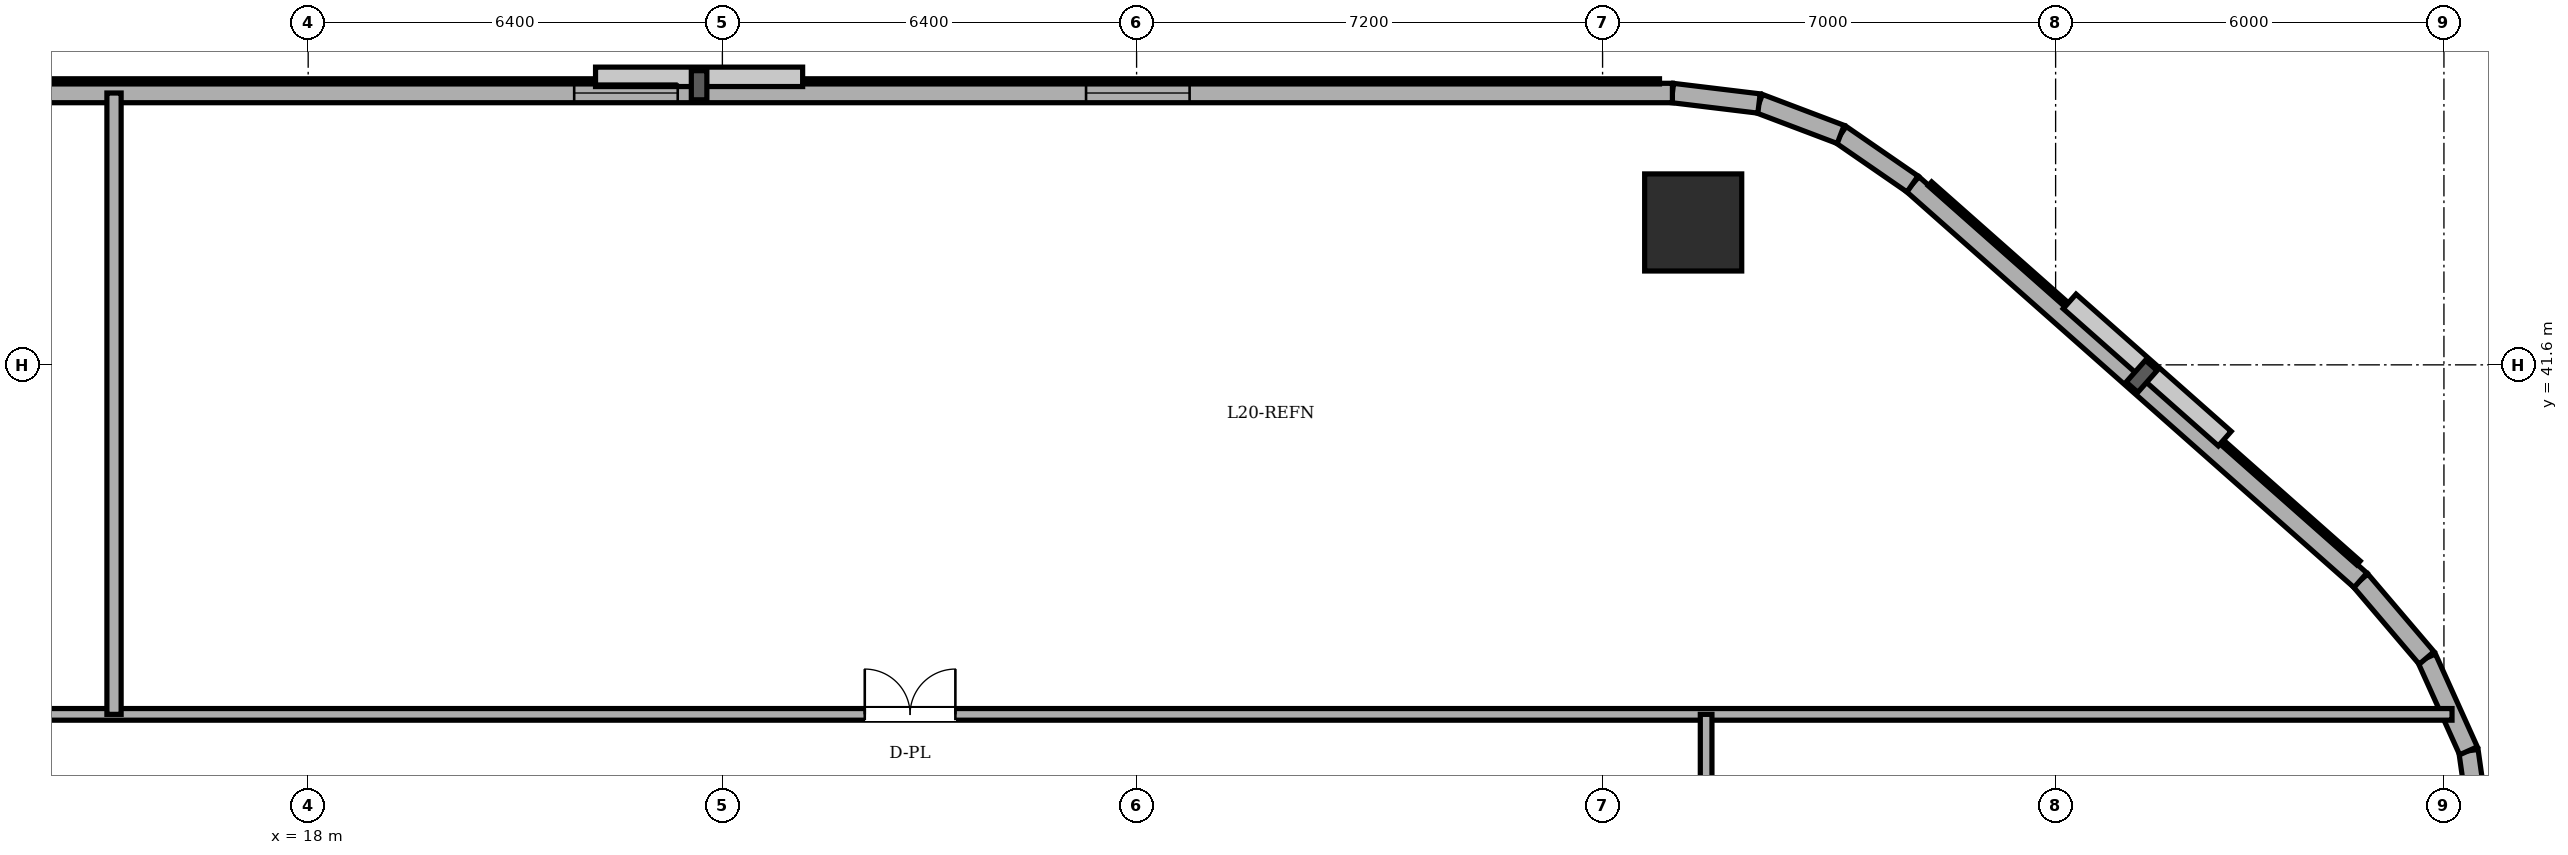
"""IFC4 building model, lengths in metres.
Left out: names, types, materials, properties, quantities, classifications, styles, units other than length and angle.
Written with IfcOpenShell. Run it as: python <this file> out.ifc"""

import sys

from ifc_helpers import new_model, si_unit, direction, frame, frame_2d, origin, origin_2d, place, context, subcontext, project, spatial, rectangle, circle, extrude, element, fill, save


model = new_model("IFC4")
c1 = context("Model", 3, precision=1e-05, world=origin(), true_north=direction((0.0, 1.0)))
c2 = subcontext(c1, "Body", "Model", "MODEL_VIEW")
j1 = project(units=[si_unit("LENGTHUNIT", "METRE"), si_unit("PLANEANGLEUNIT", "RADIAN")], contexts=[c1])
p1 = place(None, origin())
s1 = spatial("IfcSite", under=j1, at=p1, CompositionType="ELEMENT")
p2 = place(p1, origin())
s2 = spatial("IfcBuilding", under=s1, at=p2, CompositionType="ELEMENT")
p3 = place(p2, frame((0.0, 0.0, 75.6)))
s3 = spatial("IfcBuildingStorey", under=s2, at=p3, CompositionType="ELEMENT", Elevation=75.6)
p4 = place(p3, frame((39.4, 43.8, 0.0), z_axis=(0.0, 0.0, 1.0), x_axis=(1.0, 0.0, 0.0)))
e1 = element("IfcColumn", 1, at=p4, inside=s3, PredefinedType="COLUMN", context=c2, shape_type="SweptSolid", body=[
    extrude(circle(Radius=0.75, at=origin_2d()), origin(), (0.0, 0.0, 1.0), 2.96),
])
p5 = place(p3, frame((51.6, 34.077, 0.0), z_axis=(0.0, 0.0, 1.0), x_axis=(-0.140380048512, 0.990097693149, 0.0)))
e2 = element("IfcWall", 2, at=p5, inside=s3, PredefinedType="SOLIDWALL", context=c2, shape_type="SweptSolid", body=[
    extrude(rectangle(XDim=1.576, YDim=0.3, at=frame_2d((0.788, 0.0))), origin(), (0.0, 0.0, 1.0), 5.36),
])
p6 = place(p3, frame((51.379, 35.637, 0.0), z_axis=(0.0, 0.0, 1.0), x_axis=(-0.410996558744, 0.911636895206, 0.0)))
e3 = element("IfcWall", 3, at=p6, inside=s3, PredefinedType="SOLIDWALL", context=c2, shape_type="SweptSolid", body=[
    extrude(rectangle(XDim=1.574, YDim=0.3, at=frame_2d((0.787, 0.0))), origin(), (0.0, 0.0, 1.0), 5.36),
])
p7 = place(p3, frame((50.732, 37.072, 0.0), z_axis=(0.0, 0.0, 1.0), x_axis=(-0.648389989909, 0.7613083613, 0.0)))
e4 = element("IfcWall", 4, at=p7, inside=s3, PredefinedType="SOLIDWALL", context=c2, shape_type="SweptSolid", body=[
    extrude(rectangle(XDim=1.576, YDim=0.3, at=frame_2d((0.788, 0.0))), origin(), (0.0, 0.0, 1.0), 5.36),
])
p8 = place(p3, frame((49.71, 38.272, 0.0), z_axis=(0.0, 0.0, 1.0), x_axis=(-0.749010683286, 0.662557919221, 0.0)))
e5 = element("IfcWall", 5, at=p8, inside=s3, PredefinedType="SOLIDWALL", context=c2, shape_type="SweptSolid", body=[
    extrude(rectangle(XDim=9.24, YDim=0.3, at=frame_2d((4.62, 0.0))), origin(), (0.0, 0.0, 1.0), 5.36),
])
p9 = place(p3, frame((42.789, 44.394, 0.0), z_axis=(0.0, 0.0, 1.0), x_axis=(-0.823116500192, 0.567872544777, 0.0)))
e6 = element("IfcWall", 6, at=p9, inside=s3, PredefinedType="SOLIDWALL", context=c2, shape_type="SweptSolid", body=[
    extrude(rectangle(XDim=1.349, YDim=0.3, at=frame_2d((0.674, 0.0))), origin(), (0.0, 0.0, 1.0), 5.36),
])
p10 = place(p3, frame((41.679, 45.16, 0.0), z_axis=(0.0, 0.0, 1.0), x_axis=(-0.935156721165, 0.354234254216, 0.0)))
e7 = element("IfcWall", 7, at=p10, inside=s3, PredefinedType="SOLIDWALL", context=c2, shape_type="SweptSolid", body=[
    extrude(rectangle(XDim=1.349, YDim=0.3, at=frame_2d((0.675, 0.0))), origin(), (0.0, 0.0, 1.0), 5.36),
])
p11 = place(p3, frame((40.417, 45.638, 0.0), z_axis=(0.0, 0.0, 1.0), x_axis=(-0.992739027259, 0.120288086515, 0.0)))
e8 = element("IfcWall", 8, at=p11, inside=s3, PredefinedType="SOLIDWALL", context=c2, shape_type="SweptSolid", body=[
    extrude(rectangle(XDim=1.348, YDim=0.3, at=frame_2d((0.674, 0.0))), origin(), (0.0, 0.0, 1.0), 5.36),
])
p12 = place(p3, frame((39.079, 45.8, 0.0), z_axis=(0.0, 0.0, 1.0), x_axis=(-1.0, 0.0, 0.0)))
e9 = element("IfcWall", 9, at=p12, inside=s3, PredefinedType="SOLIDWALL", context=c2, shape_type="SweptSolid", body=[
    extrude(rectangle(XDim=30.079, YDim=0.3, at=frame_2d((15.04, 0.0))), origin(), (0.0, 0.0, 1.0), 5.36),
])
p13 = place(p12, frame((7.46, 0.0, 0.85)))
e10 = element("IfcOpeningElement", 10, at=p13, cuts=e9, PredefinedType="OPENING", context=c2, shape_type="SweptSolid", body=[
    extrude(rectangle(XDim=1.6, YDim=1.2, at=frame_2d((0.8, 0.6))), frame((0.0, 0.16, 0.0), z_axis=(0.0, -1.0, 0.0), x_axis=(1.0, 0.0, 0.0)), (0.0, 0.0, 1.0), 0.32),
])
p14 = place(p12, frame((15.369, 0.0, 0.85)))
e11 = element("IfcOpeningElement", 11, at=p14, cuts=e9, PredefinedType="OPENING", context=c2, shape_type="SweptSolid", body=[
    extrude(rectangle(XDim=1.6, YDim=1.2, at=frame_2d((0.8, 0.6))), frame((0.0, 0.16, 0.0), z_axis=(0.0, -1.0, 0.0), x_axis=(1.0, 0.0, 0.0)), (0.0, 0.0, 1.0), 0.32),
])
p15 = place(p12, frame((25.162, 0.0, 0.85)))
e12 = element("IfcOpeningElement", 12, at=p15, cuts=e9, PredefinedType="OPENING", context=c2, shape_type="SweptSolid", body=[
    extrude(rectangle(XDim=1.6, YDim=1.2, at=frame_2d((0.8, 0.6))), frame((0.0, 0.16, 0.0), z_axis=(0.0, -1.0, 0.0), x_axis=(1.0, 0.0, 0.0)), (0.0, 0.0, 1.0), 0.32),
])
p16 = place(p12, frame((27.046, 0.0, 0.85)))
e13 = element("IfcOpeningElement", 13, at=p16, cuts=e9, PredefinedType="OPENING", context=c2, shape_type="SweptSolid", body=[
    extrude(rectangle(XDim=1.6, YDim=1.2, at=frame_2d((0.8, 0.6))), frame((0.0, 0.16, 0.0), z_axis=(0.0, -1.0, 0.0), x_axis=(1.0, 0.0, 0.0)), (0.0, 0.0, 1.0), 0.32),
])
p17 = place(p3, frame((13.5, 36.2, 0.0), z_axis=(0.0, 0.0, 1.0), x_axis=(1.0, 0.0, 0.0)))
e14 = element("IfcWall", 14, at=p17, inside=s3, PredefinedType="PARTITIONING", context=c2, shape_type="SweptSolid", body=[
    extrude(rectangle(XDim=37.625, YDim=0.18, at=frame_2d((18.812, 0.0))), origin(), (0.0, 0.0, 1.0), 5.36),
])
p18 = place(p17, frame((13.1, 0.0, 0.0)))
e15 = element("IfcOpeningElement", 15, at=p18, cuts=e14, PredefinedType="OPENING", context=c2, shape_type="SweptSolid", body=[
    extrude(rectangle(XDim=1.4, YDim=2.25, at=frame_2d((0.7, 1.125))), frame((0.0, 0.1, 0.0), z_axis=(0.0, -1.0, 0.0), x_axis=(1.0, 0.0, 0.0)), (0.0, 0.0, 1.0), 0.2),
])
p19 = place(p3, frame((15.0, 36.2, 0.0), z_axis=(0.0, 0.0, 1.0), x_axis=(0.0, 1.0, 0.0)))
e16 = element("IfcWall", 16, at=p19, inside=s3, PredefinedType="PARTITIONING", context=c2, shape_type="SweptSolid", body=[
    extrude(rectangle(XDim=9.6, YDim=0.22, at=frame_2d((4.8, 0.0))), origin(), (0.0, 0.0, 1.0), 5.36),
])
p20 = place(p3, frame((39.6, 11.8, 0.0), z_axis=(0.0, 0.0, 1.0), x_axis=(0.0, 1.0, 0.0)))
e17 = element("IfcWall", 17, at=p20, inside=s3, PredefinedType="PARTITIONING", context=c2, shape_type="SweptSolid", body=[
    extrude(rectangle(XDim=24.4, YDim=0.18, at=frame_2d((12.2, 0.0))), origin(), (0.0, 0.0, 1.0), 5.36),
])
p21 = place(p20, frame((18.07, 0.0, 0.0)))
e18 = element("IfcOpeningElement", 18, at=p21, cuts=e17, PredefinedType="OPENING", context=c2, shape_type="SweptSolid", body=[
    extrude(rectangle(XDim=1.4, YDim=2.25, at=frame_2d((0.7, 1.125))), frame((0.0, 0.1, 0.0), z_axis=(0.0, -1.0, 0.0), x_axis=(1.0, 0.0, 0.0)), (0.0, 0.0, 1.0), 0.2),
])
p22 = place(p20, frame((5.225, 0.0, 0.0)))
e19 = element("IfcOpeningElement", 19, at=p22, cuts=e17, PredefinedType="OPENING", context=c2, shape_type="SweptSolid", body=[
    extrude(rectangle(XDim=1.4, YDim=2.25, at=frame_2d((0.7, 1.125))), frame((0.0, 0.1, 0.0), z_axis=(0.0, -1.0, 0.0), x_axis=(1.0, 0.0, 0.0)), (0.0, 0.0, 1.0), 0.2),
])
p23 = place(p20, frame((10.2, 0.0, 0.0)))
e20 = element("IfcOpeningElement", 20, at=p23, cuts=e17, PredefinedType="OPENING", context=c2, shape_type="SweptSolid", body=[
    extrude(rectangle(XDim=1.4, YDim=2.25, at=frame_2d((0.7, 1.125))), frame((0.0, 0.1, 0.0), z_axis=(0.0, -1.0, 0.0), x_axis=(1.0, 0.0, 0.0)), (0.0, 0.0, 1.0), 0.2),
])
p24 = place(p13, origin())
e21 = element("IfcWindow", 21, at=p24, inside=s3, PartitioningType="DOUBLE_PANEL_VERTICAL", PredefinedType="WINDOW", context=c2, shape_type="SweptSolid", body=[
    extrude(rectangle(XDim=1.6, YDim=1.2, at=frame_2d((0.8, 0.6))), frame((0.0, 0.03, 0.0), z_axis=(0.0, -1.0, 0.0), x_axis=(1.0, 0.0, 0.0)), (0.0, 0.0, 1.0), 0.06),
])
fill(e10, e21)
p25 = place(p14, origin())
e22 = element("IfcWindow", 22, at=p25, inside=s3, PartitioningType="DOUBLE_PANEL_VERTICAL", PredefinedType="WINDOW", context=c2, shape_type="SweptSolid", body=[
    extrude(rectangle(XDim=1.6, YDim=1.2, at=frame_2d((0.8, 0.6))), frame((0.0, 0.03, 0.0), z_axis=(0.0, -1.0, 0.0), x_axis=(1.0, 0.0, 0.0)), (0.0, 0.0, 1.0), 0.06),
])
fill(e11, e22)
p26 = place(p18, origin())
e23 = element("IfcDoor", 23, at=p26, inside=s3, OperationType="DOUBLE_DOOR_SINGLE_SWING", PredefinedType="DOOR", context=c2, shape_type="SweptSolid", body=[
    extrude(rectangle(XDim=1.4, YDim=2.25, at=frame_2d((0.7, 1.125))), frame((0.0, 0.025, 0.0), z_axis=(0.0, -1.0, 0.0), x_axis=(1.0, 0.0, 0.0)), (0.0, 0.0, 1.0), 0.05),
])
fill(e15, e23)
save(model, sys.argv[1])
